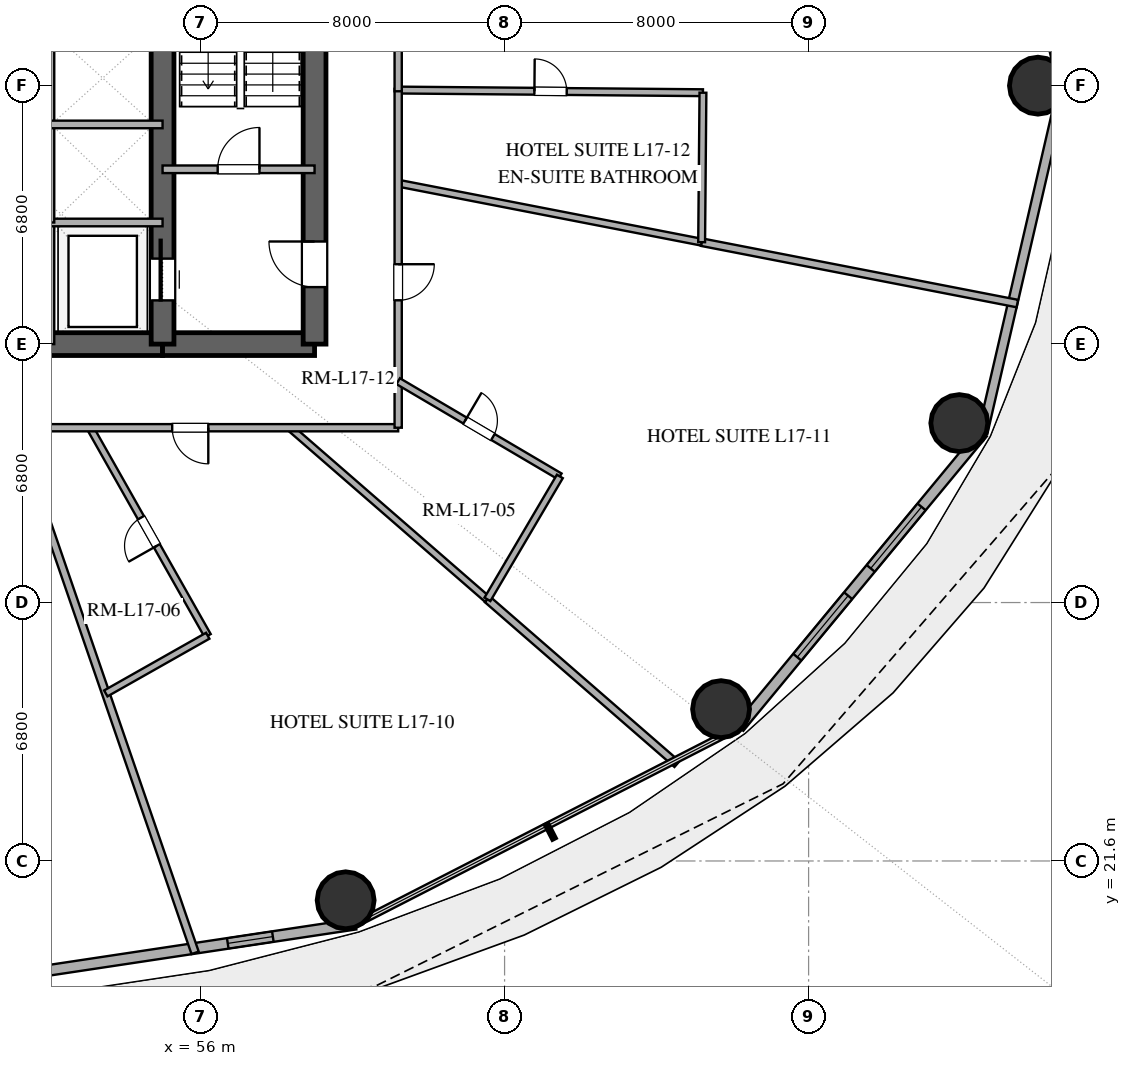
"""IFC4 building model, lengths in metres.
Left out: names, types, materials, properties, quantities, classifications, styles, units other than length and angle.
Written with IfcOpenShell. Run it as: python <this file> out.ifc"""

import sys

from ifc_helpers import new_model, si_unit, direction, frame, frame_2d, origin, origin_2d, place, context, subcontext, project, spatial, rectangle, hollow_circle, extrude, element, fill, save


model = new_model("IFC4")
c1 = context("Model", 3, precision=1e-05, world=origin(), true_north=direction((0.0, 1.0)))
c2 = subcontext(c1, "Body", "Model", "MODEL_VIEW")
j1 = project(units=[si_unit("LENGTHUNIT", "METRE"), si_unit("PLANEANGLEUNIT", "RADIAN")], contexts=[c1])
p1 = place(None, origin())
s1 = spatial("IfcSite", under=j1, at=p1, CompositionType="ELEMENT")
p2 = place(p1, origin())
s2 = spatial("IfcBuilding", under=s1, at=p2, CompositionType="ELEMENT")
p3 = place(p2, frame((0.0, 0.0, 71.4)))
s3 = spatial("IfcBuildingStorey", under=s2, at=p3, CompositionType="ELEMENT", Elevation=71.4)
p4 = place(p3, frame((41.0, 35.2, 0.0), z_axis=(0.0, 0.0, 1.0), x_axis=(1.0, 0.0, 0.0)))
e1 = element("IfcWall", 1, at=p4, inside=s3, PredefinedType="SHEAR", context=c2, shape_type="SweptSolid", body=[
    extrude(rectangle(XDim=14.0, YDim=0.6, at=frame_2d((7.0, 0.0))), origin(), (0.0, 0.0, 1.0), 3.38),
])
p5 = place(p4, frame((6.1, 0.0, 0.0)))
e2 = element("IfcOpeningElement", 2, at=p5, cuts=e1, PredefinedType="OPENING", context=c2, shape_type="SweptSolid", body=[
    extrude(rectangle(XDim=1.8, YDim=2.25, at=frame_2d((0.9, 1.125))), frame((0.0, 0.31, 0.0), z_axis=(0.0, -1.0, 0.0), x_axis=(1.0, 0.0, 0.0)), (0.0, 0.0, 1.0), 0.62),
])
p6 = place(p3, frame((55.0, 35.2, 0.0), z_axis=(0.0, 0.0, 1.0), x_axis=(1.0, 0.0, 0.0)))
e3 = element("IfcWall", 3, at=p6, inside=s3, PredefinedType="SHEAR", context=c2, shape_type="SweptSolid", body=[
    extrude(rectangle(XDim=4.0, YDim=0.6, at=frame_2d((2.0, 0.0))), origin(), (0.0, 0.0, 1.0), 3.38),
])
p7 = place(p3, frame((59.0, 35.2, 0.0), z_axis=(0.0, 0.0, 1.0), x_axis=(0.0, 1.0, 0.0)))
e4 = element("IfcWall", 4, at=p7, inside=s3, PredefinedType="SHEAR", context=c2, shape_type="SweptSolid", body=[
    extrude(rectangle(XDim=13.6, YDim=0.6, at=frame_2d((6.8, 0.0))), origin(), (0.0, 0.0, 1.0), 3.38),
])
p8 = place(p7, frame((1.5, 0.0, 0.0)))
e5 = element("IfcOpeningElement", 5, at=p8, cuts=e4, PredefinedType="OPENING", context=c2, shape_type="SweptSolid", body=[
    extrude(rectangle(XDim=1.2, YDim=2.15, at=frame_2d((0.6, 1.075))), frame((0.0, 0.31, 0.0), z_axis=(0.0, -1.0, 0.0), x_axis=(1.0, 0.0, 0.0)), (0.0, 0.0, 1.0), 0.62),
])
p9 = place(p3, frame((55.0, 35.2, 0.0), z_axis=(0.0, 0.0, 1.0), x_axis=(0.0, 1.0, 0.0)))
e6 = element("IfcWall", 6, at=p9, inside=s3, PredefinedType="SHEAR", context=c2, shape_type="SweptSolid", body=[
    extrude(rectangle(XDim=13.6, YDim=0.6, at=frame_2d((6.8, 0.0))), origin(), (0.0, 0.0, 1.0), 3.38),
])
p10 = place(p9, frame((1.15, 0.0, 0.0)))
e7 = element("IfcOpeningElement", 7, at=p10, cuts=e6, PredefinedType="OPENING", context=c2, shape_type="SweptSolid", body=[
    extrude(rectangle(XDim=1.1, YDim=2.2, at=frame_2d((0.55, 1.1))), frame((0.0, 0.31, 0.0), z_axis=(0.0, -1.0, 0.0), x_axis=(1.0, 0.0, 0.0)), (0.0, 0.0, 1.0), 0.62),
])
for number, where, z_axis, x_axis in (
    (8, (78.035, 42.0, 0.0), (0.0, 0.0, 1.0), (1.0, 0.0, 0.0)),
    (9, (59.818, 20.566, 0.0), (0.0, 0.0, 1.0), (1.0, 0.0, 0.0)),
    (10, (69.697, 25.595, 0.0), (0.0, 0.0, 1.0), (1.0, 0.0, 0.0)),
    (11, (75.966, 33.122, 0.0), (0.0, 0.0, 1.0), (1.0, 0.0, 0.0)),
):
    element("IfcColumn", number, at=place(p3, frame(where, z_axis=z_axis, x_axis=x_axis)), inside=s3, PredefinedType="COLUMN", context=c2, shape_type="SweptSolid", body=[
        extrude(hollow_circle(Radius=0.75, WallThickness=0.04, at=origin_2d()), origin(), (0.0, 0.0, 1.0), 3.38),
    ])
p11 = place(p3, frame((78.696, 42.0, 0.0), z_axis=(0.0, 0.0, 1.0), x_axis=(-0.225454452941, 0.974253709076, 0.0)))
e12 = element("IfcWall", 12, at=p11, inside=s3, PredefinedType="SOLIDWALL", context=c2, shape_type="SweptSolid", body=[
    extrude(rectangle(XDim=9.38, YDim=0.28, at=frame_2d((4.69, 0.0))), origin(), (0.0, 0.0, 1.0), 3.38),
])
p12 = place(p11, frame((6.435, 0.0, 0.0)))
e13 = element("IfcOpeningElement", 13, at=p12, cuts=e12, PredefinedType="OPENING", context=c2, shape_type="SweptSolid", body=[
    extrude(rectangle(XDim=1.4, YDim=2.2, at=frame_2d((0.7, 1.1))), frame((0.0, 0.15, 0.0), z_axis=(0.0, -1.0, 0.0), x_axis=(1.0, 0.0, 0.0)), (0.0, 0.0, 1.0), 0.3),
])
p13 = place(p3, frame((48.0, 18.12, 0.0), z_axis=(0.0, 0.0, 1.0), x_axis=(0.988864835849, 0.148816452121, 0.0)))
e14 = element("IfcWall", 14, at=p13, inside=s3, PredefinedType="SOLIDWALL", context=c2, shape_type="SweptSolid", body=[
    extrude(rectangle(XDim=12.214, YDim=0.28, at=frame_2d((6.107, 0.0))), origin(), (0.0, 0.0, 1.0), 3.38),
])
p14 = place(p13, frame((1.531, 0.0, 0.0)))
e15 = element("IfcOpeningElement", 15, at=p14, cuts=e14, PredefinedType="OPENING", context=c2, shape_type="SweptSolid", body=[
    extrude(rectangle(XDim=1.6, YDim=2.25, at=frame_2d((0.8, 1.125))), frame((0.0, 0.15, 0.0), z_axis=(0.0, -1.0, 0.0), x_axis=(1.0, 0.0, 0.0)), (0.0, 0.0, 1.0), 0.3),
])
p15 = place(p13, frame((8.814, 0.0, 0.85)))
e16 = element("IfcOpeningElement", 16, at=p15, cuts=e14, PredefinedType="OPENING", context=c2, shape_type="SweptSolid", body=[
    extrude(rectangle(XDim=1.2, YDim=1.6, at=frame_2d((0.6, 0.8))), frame((0.0, 0.15, 0.0), z_axis=(0.0, -1.0, 0.0), x_axis=(1.0, 0.0, 0.0)), (0.0, 0.0, 1.0), 0.3),
])
p16 = place(p3, frame((70.174, 25.114, 0.0), z_axis=(0.0, 0.0, 1.0), x_axis=(0.637296809613, 0.770618437657, 0.0)))
e17 = element("IfcWall", 17, at=p16, inside=s3, PredefinedType="SOLIDWALL", context=c2, shape_type="SweptSolid", body=[
    extrude(rectangle(XDim=10.053, YDim=0.28, at=frame_2d((5.027, 0.0))), origin(), (0.0, 0.0, 1.0), 3.38),
])
p17 = place(p16, frame((2.398, 0.0, 0.85)))
e18 = element("IfcOpeningElement", 18, at=p17, cuts=e17, PredefinedType="OPENING", context=c2, shape_type="SweptSolid", body=[
    extrude(rectangle(XDim=2.1, YDim=2.2, at=frame_2d((1.05, 1.1))), frame((0.0, 0.15, 0.0), z_axis=(0.0, -1.0, 0.0), x_axis=(1.0, 0.0, 0.0)), (0.0, 0.0, 1.0), 0.3),
])
p18 = place(p16, frame((5.43, 0.0, 0.85)))
e19 = element("IfcOpeningElement", 19, at=p18, cuts=e17, PredefinedType="OPENING", context=c2, shape_type="SweptSolid", body=[
    extrude(rectangle(XDim=2.1, YDim=2.2, at=frame_2d((1.05, 1.1))), frame((0.0, 0.15, 0.0), z_axis=(0.0, -1.0, 0.0), x_axis=(1.0, 0.0, 0.0)), (0.0, 0.0, 1.0), 0.3),
])
p19 = place(p3, frame((76.581, 32.862, 0.0), z_axis=(0.0, 0.0, 1.0), x_axis=(0.225454452941, 0.974253709076, 0.0)))
e20 = element("IfcWall", 20, at=p19, inside=s3, PredefinedType="SOLIDWALL", context=c2, shape_type="SweptSolid", body=[
    extrude(rectangle(XDim=9.38, YDim=0.25, at=frame_2d((4.69, 0.0))), origin(), (0.0, 0.0, 1.0), 3.38),
])
p20 = place(p3, frame((55.0, 39.8, 0.0), z_axis=(0.0, 0.0, 1.0), x_axis=(1.0, 0.0, 0.0)))
e21 = element("IfcWall", 21, at=p20, inside=s3, PredefinedType="SOLIDWALL", context=c2, shape_type="SweptSolid", body=[
    extrude(rectangle(XDim=4.0, YDim=0.2, at=frame_2d((2.0, 0.0))), origin(), (0.0, 0.0, 1.0), 2.74),
])
p21 = place(p20, frame((1.45, 0.0, 0.0)))
e22 = element("IfcOpeningElement", 22, at=p21, cuts=e21, PredefinedType="OPENING", context=c2, shape_type="SweptSolid", body=[
    extrude(rectangle(XDim=1.1, YDim=2.15, at=frame_2d((0.55, 1.075))), frame((0.0, 0.11, 0.0), z_axis=(0.0, -1.0, 0.0), x_axis=(1.0, 0.0, 0.0)), (0.0, 0.0, 1.0), 0.22),
])
p22 = place(p3, frame((52.05, 35.2, 0.0), z_axis=(0.0, 0.0, 1.0), x_axis=(0.0, 1.0, 0.0)))
e23 = element("IfcWall", 23, at=p22, inside=s3, PredefinedType="SOLIDWALL", context=c2, shape_type="SweptSolid", body=[
    extrude(rectangle(XDim=3.2, YDim=0.2, at=frame_2d((1.6, 0.0))), origin(), (0.0, 0.0, 1.0), 2.74),
])
p23 = place(p3, frame((52.05, 38.4, 0.0), z_axis=(0.0, 0.0, 1.0), x_axis=(1.0, 0.0, 0.0)))
e24 = element("IfcWall", 24, at=p23, inside=s3, PredefinedType="SOLIDWALL", context=c2, shape_type="SweptSolid", body=[
    extrude(rectangle(XDim=2.95, YDim=0.2, at=frame_2d((1.475, 0.0))), origin(), (0.0, 0.0, 1.0), 2.74),
])
p24 = place(p3, frame((52.05, 38.4, 0.0), z_axis=(0.0, 0.0, 1.0), x_axis=(0.0, 1.0, 0.0)))
e25 = element("IfcWall", 25, at=p24, inside=s3, PredefinedType="SOLIDWALL", context=c2, shape_type="SweptSolid", body=[
    extrude(rectangle(XDim=10.4, YDim=0.2, at=frame_2d((5.2, 0.0))), origin(), (0.0, 0.0, 1.0), 2.74),
])
p25 = place(p24, frame((8.2, 0.0, 0.0)))
e26 = element("IfcOpeningElement", 26, at=p25, cuts=e25, PredefinedType="OPENING", context=c2, shape_type="SweptSolid", body=[
    extrude(rectangle(XDim=1.2, YDim=2.2, at=frame_2d((0.6, 1.1))), frame((0.0, 0.11, 0.0), z_axis=(0.0, -1.0, 0.0), x_axis=(1.0, 0.0, 0.0)), (0.0, 0.0, 1.0), 0.22),
])
p26 = place(p3, frame((52.05, 40.98, 0.0), z_axis=(0.0, 0.0, 1.0), x_axis=(1.0, 0.0, 0.0)))
e27 = element("IfcWall", 27, at=p26, inside=s3, PredefinedType="SOLIDWALL", context=c2, shape_type="SweptSolid", body=[
    extrude(rectangle(XDim=2.95, YDim=0.2, at=frame_2d((1.475, 0.0))), origin(), (0.0, 0.0, 1.0), 2.74),
])
p27 = place(p3, frame((77.492, 36.267, 0.0), z_axis=(0.0, 0.0, 1.0), x_axis=(-0.981626048747, 0.190814832812, 0.0)))
e28 = element("IfcWall", 28, at=p27, inside=s3, PredefinedType="PARTITIONING", context=c2, shape_type="SweptSolid", body=[
    extrude(rectangle(XDim=8.462, YDim=0.2, at=frame_2d((4.231, 0.0))), origin(), (0.0, 0.0, 1.0), 2.74),
])
p28 = place(p3, frame((69.185, 37.882, 0.0), z_axis=(0.0, 0.0, 1.0), x_axis=(-0.981631630513, 0.190786115787, 0.0)))
e29 = element("IfcWall", 29, at=p28, inside=s3, PredefinedType="PLUMBINGWALL", context=c2, shape_type="SweptSolid", body=[
    extrude(rectangle(XDim=8.135, YDim=0.18, at=frame_2d((4.067, 0.0))), origin(), (0.0, 0.0, 1.0), 2.74),
])
p29 = place(p3, frame((61.2, 41.885, 0.0), z_axis=(0.0, 0.0, 1.0), x_axis=(0.999961832732, -0.008736880358, 0.0)))
e30 = element("IfcWall", 30, at=p29, inside=s3, PredefinedType="PLUMBINGWALL", context=c2, shape_type="SweptSolid", body=[
    extrude(rectangle(XDim=8.02, YDim=0.18, at=frame_2d((4.01, 0.0))), origin(), (0.0, 0.0, 1.0), 2.74),
])
p30 = place(p29, frame((3.585, 0.0, 0.0)))
e31 = element("IfcOpeningElement", 31, at=p30, cuts=e30, PredefinedType="OPENING", context=c2, shape_type="SweptSolid", body=[
    extrude(rectangle(XDim=0.85, YDim=2.1, at=frame_2d((0.425, 1.05))), frame((0.0, 0.1, 0.0), z_axis=(0.0, -1.0, 0.0), x_axis=(1.0, 0.0, 0.0)), (0.0, 0.0, 1.0), 0.2),
])
p31 = place(p3, frame((51.099, 33.0, 0.0), z_axis=(0.0, 0.0, 1.0), x_axis=(0.325569992405, -0.945517942741, 0.0)))
e32 = element("IfcWall", 32, at=p31, inside=s3, PredefinedType="PARTITIONING", context=c2, shape_type="SweptSolid", body=[
    extrude(rectangle(XDim=14.613, YDim=0.2, at=frame_2d((7.307, 0.0))), origin(), (0.0, 0.0, 1.0), 2.74),
])
p32 = place(p3, frame((63.549, 28.484, 0.0), z_axis=(0.0, 0.0, 1.0), x_axis=(-0.754699426586, 0.65607070923, 0.0)))
e33 = element("IfcWall", 33, at=p32, inside=s3, PredefinedType="PLUMBINGWALL", context=c2, shape_type="SweptSolid", body=[
    extrude(rectangle(XDim=6.884, YDim=0.18, at=frame_2d((3.442, 0.0))), origin(), (0.0, 0.0, 1.0), 2.74),
])
p33 = place(p3, frame((68.535, 24.149, 0.0), z_axis=(0.0, 0.0, 1.0), x_axis=(-0.754728806145, 0.656036911442, 0.0)))
e34 = element("IfcWall", 34, at=p33, inside=s3, PredefinedType="PARTITIONING", context=c2, shape_type="SweptSolid", body=[
    extrude(rectangle(XDim=6.607, YDim=0.2, at=frame_2d((3.304, 0.0))), origin(), (0.0, 0.0, 1.0), 2.74),
])
p34 = place(p3, frame((56.189, 27.527, 0.0), z_axis=(0.0, 0.0, 1.0), x_axis=(-0.492421798109, 0.870356692826, 0.0)))
e35 = element("IfcWall", 35, at=p34, inside=s3, PredefinedType="PLUMBINGWALL", context=c2, shape_type="SweptSolid", body=[
    extrude(rectangle(XDim=6.289, YDim=0.18, at=frame_2d((3.144, 0.0))), origin(), (0.0, 0.0, 1.0), 2.74),
])
p35 = place(p34, frame((2.719, 0.0, 0.0)))
e36 = element("IfcOpeningElement", 36, at=p35, cuts=e35, PredefinedType="OPENING", context=c2, shape_type="SweptSolid", body=[
    extrude(rectangle(XDim=0.85, YDim=2.1, at=frame_2d((0.425, 1.05))), frame((0.0, 0.1, 0.0), z_axis=(0.0, -1.0, 0.0), x_axis=(1.0, 0.0, 0.0)), (0.0, 0.0, 1.0), 0.2),
])
p36 = place(p3, frame((61.2, 33.0, 0.0), z_axis=(0.0, 0.0, 1.0), x_axis=(-1.0, 0.0, 0.0)))
e37 = element("IfcWall", 37, at=p36, inside=s3, PredefinedType="PARTITIONING", context=c2, shape_type="SweptSolid", body=[
    extrude(rectangle(XDim=10.135, YDim=0.19, at=frame_2d((5.067, 0.0))), origin(), (0.0, 0.0, 1.0), 2.74),
])
p37 = place(p36, frame((4.996, 0.0, 0.0)))
e38 = element("IfcOpeningElement", 38, at=p37, cuts=e37, PredefinedType="OPENING", context=c2, shape_type="SweptSolid", body=[
    extrude(rectangle(XDim=0.95, YDim=2.15, at=frame_2d((0.475, 1.075))), frame((0.0, 0.105, 0.0), z_axis=(0.0, -1.0, 0.0), x_axis=(1.0, 0.0, 0.0)), (0.0, 0.0, 1.0), 0.21),
])
p38 = place(p3, frame((61.2, 41.917, 0.0), z_axis=(0.0, 0.0, 1.0), x_axis=(0.0, -1.0, 0.0)))
e39 = element("IfcWall", 39, at=p38, inside=s3, PredefinedType="PARTITIONING", context=c2, shape_type="SweptSolid", body=[
    extrude(rectangle(XDim=8.917, YDim=0.19, at=frame_2d((4.458, 0.0))), origin(), (0.0, 0.0, 1.0), 2.74),
])
p39 = place(p38, frame((4.615, 0.0, 0.0)))
e40 = element("IfcOpeningElement", 40, at=p39, cuts=e39, PredefinedType="OPENING", context=c2, shape_type="SweptSolid", body=[
    extrude(rectangle(XDim=0.95, YDim=2.15, at=frame_2d((0.475, 1.075))), frame((0.0, 0.105, 0.0), z_axis=(0.0, -1.0, 0.0), x_axis=(1.0, 0.0, 0.0)), (0.0, 0.0, 1.0), 0.21),
])
p40 = place(p3, frame((61.2, 34.225, 0.0), z_axis=(0.0, 0.0, 1.0), x_axis=(0.861622640197, -0.507549431977, 0.0)))
e41 = element("IfcWall", 41, at=p40, inside=s3, PredefinedType="PLUMBINGWALL", context=c2, shape_type="SweptSolid", body=[
    extrude(rectangle(XDim=4.938, YDim=0.18, at=frame_2d((2.469, 0.0))), origin(), (0.0, 0.0, 1.0), 2.74),
])
p41 = place(p40, frame((2.044, 0.0, 0.0)))
e42 = element("IfcOpeningElement", 42, at=p41, cuts=e41, PredefinedType="OPENING", context=c2, shape_type="SweptSolid", body=[
    extrude(rectangle(XDim=0.85, YDim=2.1, at=frame_2d((0.425, 1.05))), frame((0.0, 0.1, 0.0), z_axis=(0.0, -1.0, 0.0), x_axis=(1.0, 0.0, 0.0)), (0.0, 0.0, 1.0), 0.2),
])
p42 = place(p3, frame((61.2, 51.0, 0.0), z_axis=(0.0, 0.0, 1.0), x_axis=(0.0, -1.0, 0.0)))
e43 = element("IfcWall", 43, at=p42, inside=s3, PredefinedType="PARTITIONING", context=c2, shape_type="SweptSolid", body=[
    extrude(rectangle(XDim=9.147, YDim=0.19, at=frame_2d((4.574, 0.0))), origin(), (0.0, 0.0, 1.0), 2.74),
])
p43 = place(p42, frame((6.309, 0.0, 0.0)))
e44 = element("IfcOpeningElement", 44, at=p43, cuts=e43, PredefinedType="OPENING", context=c2, shape_type="SweptSolid", body=[
    extrude(rectangle(XDim=0.95, YDim=2.15, at=frame_2d((0.475, 1.075))), frame((0.0, 0.105, 0.0), z_axis=(0.0, -1.0, 0.0), x_axis=(1.0, 0.0, 0.0)), (0.0, 0.0, 1.0), 0.21),
])
p44 = place(p3, frame((69.219, 41.815, 0.0), z_axis=(0.0, 0.0, 1.0), x_axis=(-0.008691005249, -0.999962232501, 0.0)))
e45 = element("IfcWall", 45, at=p44, inside=s3, PredefinedType="PLUMBINGWALL", context=c2, shape_type="SweptSolid", body=[
    extrude(rectangle(XDim=3.933, YDim=0.18, at=frame_2d((1.966, 0.0))), origin(), (0.0, 0.0, 1.0), 2.74),
])
p45 = place(p3, frame((65.454, 31.719, 0.0), z_axis=(0.0, 0.0, 1.0), x_axis=(-0.507594049508, -0.861596356134, 0.0)))
e46 = element("IfcWall", 46, at=p45, inside=s3, PredefinedType="PLUMBINGWALL", context=c2, shape_type="SweptSolid", body=[
    extrude(rectangle(XDim=3.754, YDim=0.18, at=frame_2d((1.877, 0.0))), origin(), (0.0, 0.0, 1.0), 2.74),
])
p46 = place(p3, frame((53.506, 26.009, 0.0), z_axis=(0.0, 0.0, 1.0), x_axis=(0.87034589465, 0.492440883422, 0.0)))
e47 = element("IfcWall", 47, at=p46, inside=s3, PredefinedType="PLUMBINGWALL", context=c2, shape_type="SweptSolid", body=[
    extrude(rectangle(XDim=3.082, YDim=0.18, at=frame_2d((1.541, 0.0))), origin(), (0.0, 0.0, 1.0), 2.74),
])
p47 = place(p15, origin())
e48 = element("IfcWindow", 48, at=p47, inside=s3, PartitioningType="SINGLE_PANEL", PredefinedType="WINDOW", context=c2, shape_type="SweptSolid", body=[
    extrude(rectangle(XDim=1.2, YDim=1.6, at=frame_2d((0.6, 0.8))), frame((0.0, 0.03, 0.0), z_axis=(0.0, -1.0, 0.0), x_axis=(1.0, 0.0, 0.0)), (0.0, 0.0, 1.0), 0.06),
])
fill(e16, e48)
p48 = place(p17, origin())
e49 = element("IfcWindow", 49, at=p48, inside=s3, PartitioningType="SINGLE_PANEL", PredefinedType="WINDOW", context=c2, shape_type="SweptSolid", body=[
    extrude(rectangle(XDim=2.1, YDim=2.2, at=frame_2d((1.05, 1.1))), frame((0.0, 0.03, 0.0), z_axis=(0.0, -1.0, 0.0), x_axis=(1.0, 0.0, 0.0)), (0.0, 0.0, 1.0), 0.06),
])
fill(e18, e49)
p49 = place(p18, origin())
e50 = element("IfcWindow", 50, at=p49, inside=s3, PartitioningType="SINGLE_PANEL", PredefinedType="WINDOW", context=c2, shape_type="SweptSolid", body=[
    extrude(rectangle(XDim=2.1, YDim=2.2, at=frame_2d((1.05, 1.1))), frame((0.0, 0.03, 0.0), z_axis=(0.0, -1.0, 0.0), x_axis=(1.0, 0.0, 0.0)), (0.0, 0.0, 1.0), 0.06),
])
fill(e19, e50)
p50 = place(p10, origin())
e51 = element("IfcDoor", 51, at=p50, inside=s3, OperationType="SLIDING_TO_RIGHT", PredefinedType="DOOR", context=c2, shape_type="SweptSolid", body=[
    extrude(rectangle(XDim=1.1, YDim=2.2, at=frame_2d((0.55, 1.1))), frame((0.0, 0.025, 0.0), z_axis=(0.0, -1.0, 0.0), x_axis=(1.0, 0.0, 0.0)), (0.0, 0.0, 1.0), 0.05),
])
fill(e7, e51)
p51 = place(p8, origin())
e52 = element("IfcDoor", 52, at=p51, inside=s3, OperationType="SINGLE_SWING_RIGHT", PredefinedType="DOOR", context=c2, shape_type="SweptSolid", body=[
    extrude(rectangle(XDim=1.2, YDim=2.15, at=frame_2d((0.6, 1.075))), frame((0.0, 0.025, 0.0), z_axis=(0.0, -1.0, 0.0), x_axis=(1.0, 0.0, 0.0)), (0.0, 0.0, 1.0), 0.05),
])
fill(e5, e52)
p52 = place(p21, origin())
e53 = element("IfcDoor", 53, at=p52, inside=s3, OperationType="SINGLE_SWING_RIGHT", PredefinedType="DOOR", context=c2, shape_type="SweptSolid", body=[
    extrude(rectangle(XDim=1.1, YDim=2.15, at=frame_2d((0.55, 1.075))), frame((0.0, 0.025, 0.0), z_axis=(0.0, -1.0, 0.0), x_axis=(1.0, 0.0, 0.0)), (0.0, 0.0, 1.0), 0.05),
])
fill(e22, e53)
p53 = place(p30, origin())
e54 = element("IfcDoor", 54, at=p53, inside=s3, OperationType="SINGLE_SWING_LEFT", PredefinedType="DOOR", context=c2, shape_type="SweptSolid", body=[
    extrude(rectangle(XDim=0.85, YDim=2.1, at=frame_2d((0.425, 1.05))), frame((0.0, 0.025, 0.0), z_axis=(0.0, -1.0, 0.0), x_axis=(1.0, 0.0, 0.0)), (0.0, 0.0, 1.0), 0.05),
])
fill(e31, e54)
p54 = place(p35, origin())
e55 = element("IfcDoor", 55, at=p54, inside=s3, OperationType="SINGLE_SWING_LEFT", PredefinedType="DOOR", context=c2, shape_type="SweptSolid", body=[
    extrude(rectangle(XDim=0.85, YDim=2.1, at=frame_2d((0.425, 1.05))), frame((0.0, 0.025, 0.0), z_axis=(0.0, -1.0, 0.0), x_axis=(1.0, 0.0, 0.0)), (0.0, 0.0, 1.0), 0.05),
])
fill(e36, e55)
p55 = place(p37, origin())
e56 = element("IfcDoor", 56, at=p55, inside=s3, OperationType="SINGLE_SWING_LEFT", PredefinedType="DOOR", context=c2, shape_type="SweptSolid", body=[
    extrude(rectangle(XDim=0.95, YDim=2.15, at=frame_2d((0.475, 1.075))), frame((0.0, 0.025, 0.0), z_axis=(0.0, -1.0, 0.0), x_axis=(1.0, 0.0, 0.0)), (0.0, 0.0, 1.0), 0.05),
])
fill(e38, e56)
p56 = place(p39, origin())
e57 = element("IfcDoor", 57, at=p56, inside=s3, OperationType="SINGLE_SWING_LEFT", PredefinedType="DOOR", context=c2, shape_type="SweptSolid", body=[
    extrude(rectangle(XDim=0.95, YDim=2.15, at=frame_2d((0.475, 1.075))), frame((0.0, 0.025, 0.0), z_axis=(0.0, -1.0, 0.0), x_axis=(1.0, 0.0, 0.0)), (0.0, 0.0, 1.0), 0.05),
])
fill(e40, e57)
p57 = place(p41, origin())
e58 = element("IfcDoor", 58, at=p57, inside=s3, OperationType="SINGLE_SWING_LEFT", PredefinedType="DOOR", context=c2, shape_type="SweptSolid", body=[
    extrude(rectangle(XDim=0.85, YDim=2.1, at=frame_2d((0.425, 1.05))), frame((0.0, 0.025, 0.0), z_axis=(0.0, -1.0, 0.0), x_axis=(1.0, 0.0, 0.0)), (0.0, 0.0, 1.0), 0.05),
])
fill(e42, e58)
save(model, sys.argv[1])
